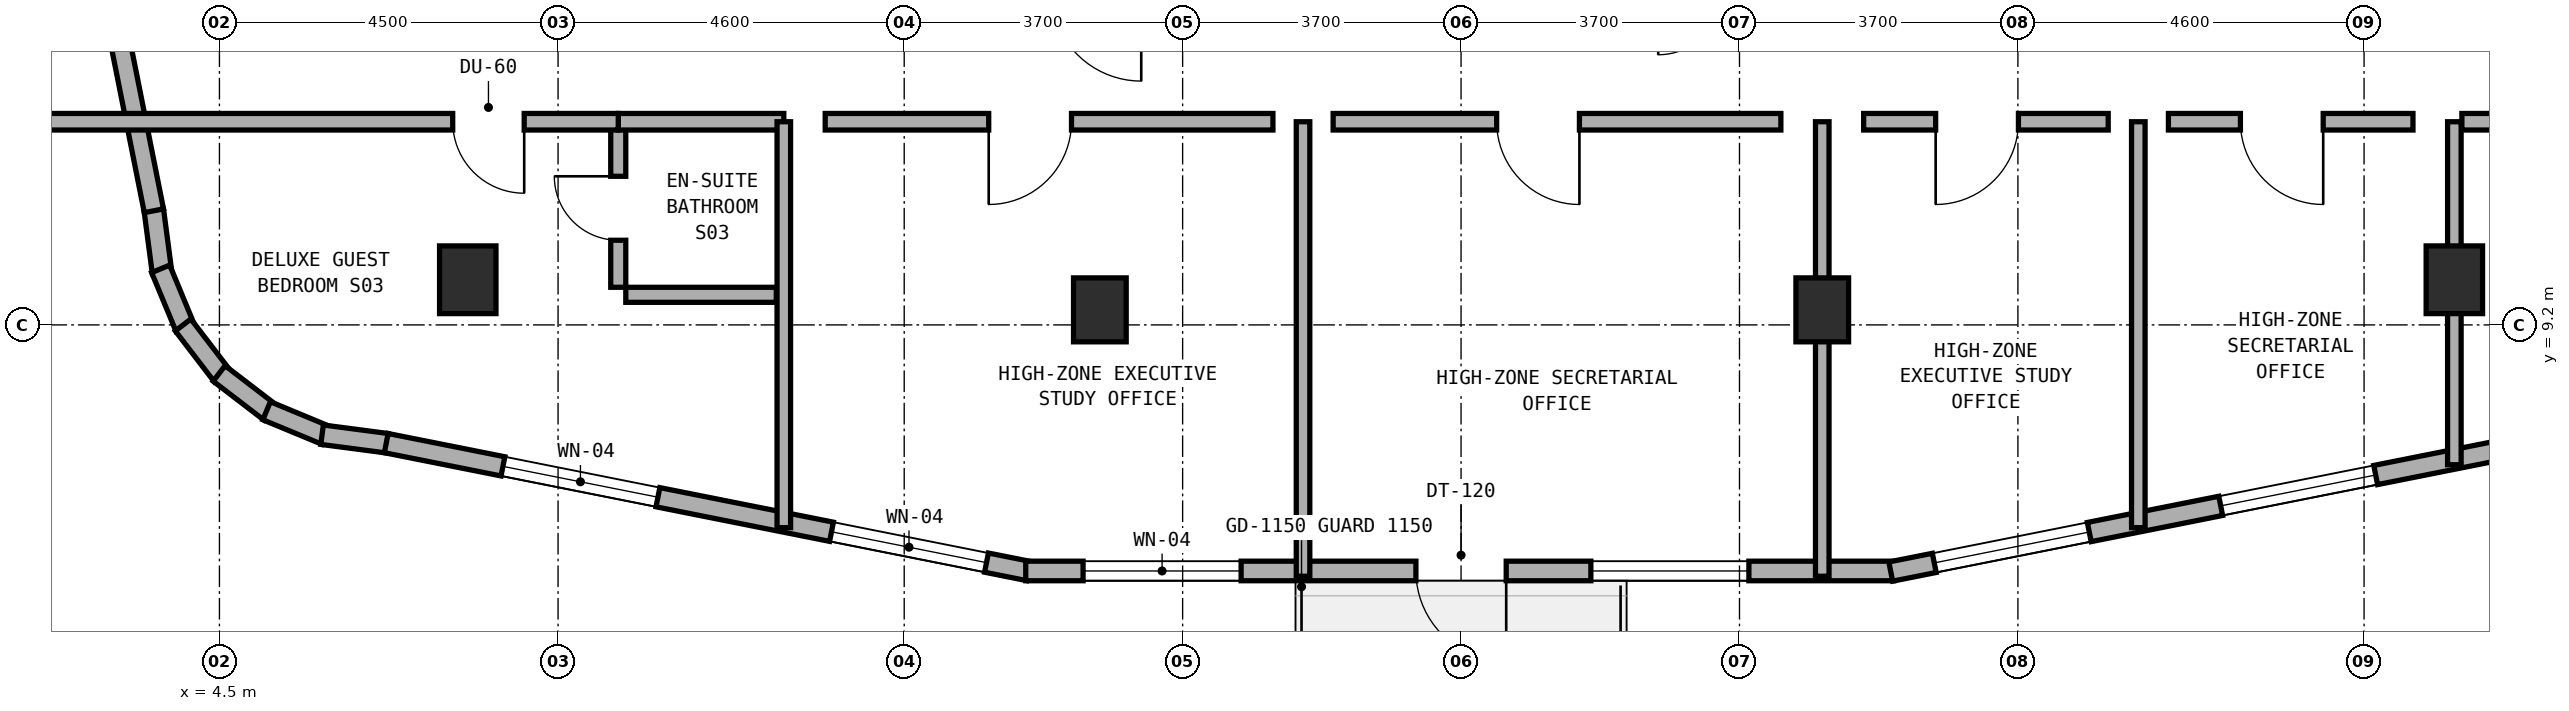
"""IFC4 building model, lengths in metres.
Left out: names, types, materials, properties, quantities, classifications, styles, units other than length and angle.
Written with IfcOpenShell. Run it as: python <this file> out.ifc"""

import sys

from ifc_helpers import new_model, si_unit, direction, frame, frame_2d, origin, origin_2d, place, context, subcontext, project, spatial, rectangle, extrude, element, fill, save


model = new_model("IFC4")
c1 = context("Model", 3, precision=1e-05, world=origin(), true_north=direction((0.0, 1.0)))
c2 = subcontext(c1, "Body", "Model", "MODEL_VIEW")
j1 = project(units=[si_unit("LENGTHUNIT", "METRE"), si_unit("PLANEANGLEUNIT", "RADIAN")], contexts=[c1])
p1 = place(None, origin())
s1 = spatial("IfcSite", under=j1, at=p1, CompositionType="ELEMENT")
p2 = place(p1, origin())
s2 = spatial("IfcBuilding", under=s1, at=p2, CompositionType="ELEMENT")
p3 = place(p2, frame((0.0, 0.0, 231.5)))
s3 = spatial("IfcBuildingStorey", under=s2, at=p3, CompositionType="ELEMENT", Elevation=231.5)
for number, where, z_axis, x_axis in (
    (1, (16.2, 9.4, 0.0), (0.0, 0.0, 1.0), (1.0, 0.0, 0.0)),
    (2, (25.8, 9.4, 0.0), (0.0, 0.0, 1.0), (1.0, 0.0, 0.0)),
):
    element("IfcColumn", number, at=place(p3, frame(where, z_axis=z_axis, x_axis=x_axis)), inside=s3, PredefinedType="COLUMN", context=c2, shape_type="SweptSolid", body=[
        extrude(rectangle(XDim=0.7, YDim=0.85, at=origin_2d()), origin(), (0.0, 0.0, 1.0), 3.6),
    ])
for number, where, z_axis, x_axis in (
    (3, (7.8, 9.8, 0.0), (0.0, 0.0, 1.0), (1.0, 0.0, 0.0)),
    (4, (34.2, 9.8, 0.0), (0.0, 0.0, 1.0), (1.0, 0.0, 0.0)),
):
    element("IfcColumn", number, at=place(p3, frame(where, z_axis=z_axis, x_axis=x_axis)), inside=s3, PredefinedType="COLUMN", context=c2, shape_type="SweptSolid", body=[
        extrude(rectangle(XDim=0.75, YDim=0.9, at=origin_2d()), origin(), (0.0, 0.0, 1.0), 3.6),
    ])
p4 = place(p3, frame((3.628, 10.725, 0.0), z_axis=(0.0, 0.0, 1.0), x_axis=(0.130954667764, -0.9913883573, 0.0)))
e5 = element("IfcWall", 5, at=p4, inside=s3, PredefinedType="STANDARD", context=c2, shape_type="SweptSolid", body=[
    extrude(rectangle(XDim=0.833, YDim=0.26, at=frame_2d((0.417, 0.0))), origin(), (0.0, 0.0, 1.0), 3.32),
])
p5 = place(p3, frame((3.719, 9.945, 0.0), z_axis=(0.0, 0.0, 1.0), x_axis=(0.382985169477, -0.923754491172, 0.0)))
e6 = element("IfcWall", 6, at=p5, inside=s3, PredefinedType="STANDARD", context=c2, shape_type="SweptSolid", body=[
    extrude(rectangle(XDim=0.851, YDim=0.26, at=frame_2d((0.426, 0.0))), origin(), (0.0, 0.0, 1.0), 3.32),
])
for number, where, z_axis, x_axis in (
    (7, (4.017, 9.199, 0.0), (0.0, 0.0, 1.0), (0.608, -0.794, 0.0)),
    (8, (4.496, 8.555, 0.0), (0.0, 0.0, 1.0), (0.794, -0.608, 0.0)),
):
    element("IfcWall", number, at=place(p3, frame(where, z_axis=z_axis, x_axis=x_axis)), inside=s3, PredefinedType="STANDARD", context=c2, shape_type="SweptSolid", body=[
        extrude(rectangle(XDim=0.85, YDim=0.26, at=frame_2d((0.425, 0.0))), origin(), (0.0, 0.0, 1.0), 3.32),
    ])
p6 = place(p3, frame((5.127, 8.059, 0.0), z_axis=(0.0, 0.0, 1.0), x_axis=(0.923652976167, -0.383229930484, 0.0)))
e9 = element("IfcWall", 9, at=p6, inside=s3, PredefinedType="STANDARD", context=c2, shape_type="SweptSolid", body=[
    extrude(rectangle(XDim=0.851, YDim=0.26, at=frame_2d((0.426, 0.0))), origin(), (0.0, 0.0, 1.0), 3.32),
])
p7 = place(p3, frame((5.864, 7.741, 0.0), z_axis=(0.0, 0.0, 1.0), x_axis=(0.991493480548, -0.130156359936, 0.0)))
e10 = element("IfcWall", 10, at=p7, inside=s3, PredefinedType="STANDARD", context=c2, shape_type="SweptSolid", body=[
    extrude(rectangle(XDim=0.868, YDim=0.26, at=frame_2d((0.434, 0.0))), origin(), (0.0, 0.0, 1.0), 3.32),
])
p8 = place(p3, frame((6.717, 7.629, 0.0), z_axis=(0.0, 0.0, 1.0), x_axis=(0.980748582507, -0.1952747242, 0.0)))
e11 = element("IfcWall", 11, at=p8, inside=s3, PredefinedType="STANDARD", context=c2, shape_type="SweptSolid", body=[
    extrude(rectangle(XDim=8.705, YDim=0.26, at=frame_2d((4.353, 0.0))), origin(), (0.0, 0.0, 1.0), 3.32),
])
p9 = place(p8, frame((1.581, 0.0, 0.85)))
e12 = element("IfcOpeningElement", 12, at=p9, cuts=e11, PredefinedType="OPENING", context=c2, shape_type="SweptSolid", body=[
    extrude(rectangle(XDim=2.1, YDim=1.5, at=frame_2d((1.05, 0.75))), frame((0.0, 0.14, 0.0), z_axis=(0.0, -1.0, 0.0), x_axis=(1.0, 0.0, 0.0)), (0.0, 0.0, 1.0), 0.28),
])
p10 = place(p8, frame((6.033, 0.0, 0.85)))
e13 = element("IfcOpeningElement", 13, at=p10, cuts=e11, PredefinedType="OPENING", context=c2, shape_type="SweptSolid", body=[
    extrude(rectangle(XDim=2.1, YDim=1.5, at=frame_2d((1.05, 0.75))), frame((0.0, 0.14, 0.0), z_axis=(0.0, -1.0, 0.0), x_axis=(1.0, 0.0, 0.0)), (0.0, 0.0, 1.0), 0.28),
])
p11 = place(p3, frame((15.215, 5.93, 0.0), z_axis=(0.0, 0.0, 1.0), x_axis=(1.0, 0.0, 0.0)))
e14 = element("IfcWall", 14, at=p11, inside=s3, PredefinedType="STANDARD", context=c2, shape_type="SweptSolid", body=[
    extrude(rectangle(XDim=11.535, YDim=0.26, at=frame_2d((5.768, 0.0))), origin(), (0.0, 0.0, 1.0), 3.32),
])
p12 = place(p11, frame((5.185, 0.0, 0.0)))
e15 = element("IfcOpeningElement", 15, at=p12, cuts=e14, PredefinedType="OPENING", context=c2, shape_type="SweptSolid", body=[
    extrude(rectangle(XDim=1.2, YDim=2.15, at=frame_2d((0.6, 1.075))), frame((0.0, 0.14, 0.0), z_axis=(0.0, -1.0, 0.0), x_axis=(1.0, 0.0, 0.0)), (0.0, 0.0, 1.0), 0.28),
])
p13 = place(p11, frame((0.762, 0.0, 0.85)))
e16 = element("IfcOpeningElement", 16, at=p13, cuts=e14, PredefinedType="OPENING", context=c2, shape_type="SweptSolid", body=[
    extrude(rectangle(XDim=2.1, YDim=1.5, at=frame_2d((1.05, 0.75))), frame((0.0, 0.14, 0.0), z_axis=(0.0, -1.0, 0.0), x_axis=(1.0, 0.0, 0.0)), (0.0, 0.0, 1.0), 0.28),
])
p14 = place(p11, frame((7.51, 0.0, 0.85)))
e17 = element("IfcOpeningElement", 17, at=p14, cuts=e14, PredefinedType="OPENING", context=c2, shape_type="SweptSolid", body=[
    extrude(rectangle(XDim=2.1, YDim=1.5, at=frame_2d((1.05, 0.75))), frame((0.0, 0.14, 0.0), z_axis=(0.0, -1.0, 0.0), x_axis=(1.0, 0.0, 0.0)), (0.0, 0.0, 1.0), 0.28),
])
p15 = place(p3, frame((26.71, 5.922, 0.0), z_axis=(0.0, 0.0, 1.0), x_axis=(0.980752174324, 0.195256683773, 0.0)))
e18 = element("IfcWall", 18, at=p15, inside=s3, PredefinedType="STANDARD", context=c2, shape_type="SweptSolid", body=[
    extrude(rectangle(XDim=8.741, YDim=0.26, at=frame_2d((4.371, 0.0))), origin(), (0.0, 0.0, 1.0), 3.32),
])
p16 = place(p15, frame((0.59, 0.0, 0.85)))
e19 = element("IfcOpeningElement", 19, at=p16, cuts=e18, PredefinedType="OPENING", context=c2, shape_type="SweptSolid", body=[
    extrude(rectangle(XDim=2.1, YDim=1.5, at=frame_2d((1.05, 0.75))), frame((0.0, 0.14, 0.0), z_axis=(0.0, -1.0, 0.0), x_axis=(1.0, 0.0, 0.0)), (0.0, 0.0, 1.0), 0.28),
])
p17 = place(p15, frame((4.471, 0.0, 0.85)))
e20 = element("IfcOpeningElement", 20, at=p17, cuts=e18, PredefinedType="OPENING", context=c2, shape_type="SweptSolid", body=[
    extrude(rectangle(XDim=2.1, YDim=1.5, at=frame_2d((1.05, 0.75))), frame((0.0, 0.14, 0.0), z_axis=(0.0, -1.0, 0.0), x_axis=(1.0, 0.0, 0.0)), (0.0, 0.0, 1.0), 0.28),
])
p18 = place(p3, frame((1.916, 19.319, 0.0), z_axis=(0.0, 0.0, 1.0), x_axis=(0.195291715883, -0.980745199176, 0.0)))
e21 = element("IfcWall", 21, at=p18, inside=s3, PredefinedType="STANDARD", context=c2, shape_type="SweptSolid", body=[
    extrude(rectangle(XDim=8.771, YDim=0.26, at=frame_2d((4.385, 0.0))), origin(), (0.0, 0.0, 1.0), 3.32),
])
p19 = place(p18, frame((2.67, 0.0, 0.85)))
e22 = element("IfcOpeningElement", 22, at=p19, cuts=e21, PredefinedType="OPENING", context=c2, shape_type="SweptSolid", body=[
    extrude(rectangle(XDim=2.1, YDim=1.5, at=frame_2d((1.05, 0.75))), frame((0.0, 0.14, 0.0), z_axis=(0.0, -1.0, 0.0), x_axis=(1.0, 0.0, 0.0)), (0.0, 0.0, 1.0), 0.28),
])
p20 = place(p3, frame((9.8, 9.7, 0.0), z_axis=(0.0, 0.0, 1.0), x_axis=(0.0, 1.0, 0.0)))
e23 = element("IfcWall", 23, at=p20, inside=s3, PredefinedType="PLUMBINGWALL", context=c2, shape_type="SweptSolid", body=[
    extrude(rectangle(XDim=2.1, YDim=0.2, at=frame_2d((1.05, 0.0))), origin(), (0.0, 0.0, 1.0), 2.895),
])
p21 = place(p20, frame((0.625, 0.0, 0.0)))
e24 = element("IfcOpeningElement", 24, at=p21, cuts=e23, PredefinedType="OPENING", context=c2, shape_type="SweptSolid", body=[
    extrude(rectangle(XDim=0.85, YDim=2.1, at=frame_2d((0.425, 1.05))), frame((0.0, 0.11, 0.0), z_axis=(0.0, -1.0, 0.0), x_axis=(1.0, 0.0, 0.0)), (0.0, 0.0, 1.0), 0.22),
])
p22 = place(p3, frame((9.9, 9.6, 0.0), z_axis=(0.0, 0.0, 1.0), x_axis=(1.0, 0.0, 0.0)))
e25 = element("IfcWall", 25, at=p22, inside=s3, PredefinedType="PLUMBINGWALL", context=c2, shape_type="SweptSolid", body=[
    extrude(rectangle(XDim=2.0, YDim=0.2, at=frame_2d((1.0, 0.0))), origin(), (0.0, 0.0, 1.0), 3.015),
])
p23 = place(p3, frame((9.8, 11.9, 0.0), z_axis=(0.0, 0.0, 1.0), x_axis=(1.0, 0.0, 0.0)))
e26 = element("IfcWall", 26, at=p23, inside=s3, PredefinedType="SOLIDWALL", context=c2, shape_type="SweptSolid", body=[
    extrude(rectangle(XDim=2.2, YDim=0.22, at=frame_2d((1.1, 0.0))), origin(), (0.0, 0.0, 1.0), 3.32),
])
p24 = place(p3, frame((1.96, 11.9, 0.0), z_axis=(0.0, 0.0, 1.0), x_axis=(1.0, 0.0, 0.0)))
e27 = element("IfcWall", 27, at=p24, inside=s3, PredefinedType="SOLIDWALL", context=c2, shape_type="SweptSolid", body=[
    extrude(rectangle(XDim=7.84, YDim=0.22, at=frame_2d((3.92, 0.0))), origin(), (0.0, 0.0, 1.0), 2.745),
])
p25 = place(p24, frame((5.64, 0.0, 0.0)))
e28 = element("IfcOpeningElement", 28, at=p25, cuts=e27, PredefinedType="OPENING", context=c2, shape_type="SweptSolid", body=[
    extrude(rectangle(XDim=0.95, YDim=2.1, at=frame_2d((0.475, 1.05))), frame((0.0, 0.12, 0.0), z_axis=(0.0, -1.0, 0.0), x_axis=(1.0, 0.0, 0.0)), (0.0, 0.0, 1.0), 0.24),
])
p26 = place(p3, frame((12.0, 6.506, 0.0), z_axis=(0.0, 0.0, 1.0), x_axis=(0.0, 1.0, 0.0)))
e29 = element("IfcWall", 29, at=p26, inside=s3, PredefinedType="SOLIDWALL", context=c2, shape_type="SweptSolid", body=[
    extrude(rectangle(XDim=5.394, YDim=0.18, at=frame_2d((2.697, 0.0))), origin(), (0.0, 0.0, 1.0), 2.895),
])
p27 = place(p3, frame((18.9, 5.86, 0.0), z_axis=(0.0, 0.0, 1.0), x_axis=(0.0, 1.0, 0.0)))
e30 = element("IfcWall", 30, at=p27, inside=s3, PredefinedType="SOLIDWALL", context=c2, shape_type="SweptSolid", body=[
    extrude(rectangle(XDim=6.04, YDim=0.18, at=frame_2d((3.02, 0.0))), origin(), (0.0, 0.0, 1.0), 2.895),
])
p28 = place(p3, frame((12.55, 11.9, 0.0), z_axis=(0.0, 0.0, 1.0), x_axis=(1.0, 0.0, 0.0)))
e31 = element("IfcWall", 31, at=p28, inside=s3, PredefinedType="SOLIDWALL", context=c2, shape_type="SweptSolid", body=[
    extrude(rectangle(XDim=5.95, YDim=0.22, at=frame_2d((2.975, 0.0))), origin(), (0.0, 0.0, 1.0), 2.745),
])
p29 = place(p28, frame((2.173, 0.0, 0.0)))
e32 = element("IfcOpeningElement", 32, at=p29, cuts=e31, PredefinedType="OPENING", context=c2, shape_type="SweptSolid", body=[
    extrude(rectangle(XDim=1.1, YDim=2.1, at=frame_2d((0.55, 1.05))), frame((0.0, 0.12, 0.0), z_axis=(0.0, -1.0, 0.0), x_axis=(1.0, 0.0, 0.0)), (0.0, 0.0, 1.0), 0.24),
])
p30 = place(p3, frame((19.3, 11.9, 0.0), z_axis=(0.0, 0.0, 1.0), x_axis=(1.0, 0.0, 0.0)))
e33 = element("IfcWall", 33, at=p30, inside=s3, PredefinedType="SOLIDWALL", context=c2, shape_type="SweptSolid", body=[
    extrude(rectangle(XDim=5.95, YDim=0.22, at=frame_2d((2.975, 0.0))), origin(), (0.0, 0.0, 1.0), 3.32),
])
p31 = place(p30, frame((2.173, 0.0, 0.0)))
e34 = element("IfcOpeningElement", 34, at=p31, cuts=e33, PredefinedType="OPENING", context=c2, shape_type="SweptSolid", body=[
    extrude(rectangle(XDim=1.1, YDim=2.1, at=frame_2d((0.55, 1.05))), frame((0.0, 0.12, 0.0), z_axis=(0.0, -1.0, 0.0), x_axis=(1.0, 0.0, 0.0)), (0.0, 0.0, 1.0), 0.24),
])
p32 = place(p3, frame((25.8, 5.86, 0.0), z_axis=(0.0, 0.0, 1.0), x_axis=(0.0, 1.0, 0.0)))
e35 = element("IfcWall", 35, at=p32, inside=s3, PredefinedType="SOLIDWALL", context=c2, shape_type="SweptSolid", body=[
    extrude(rectangle(XDim=6.04, YDim=0.18, at=frame_2d((3.02, 0.0))), origin(), (0.0, 0.0, 1.0), 2.745),
])
p33 = place(p3, frame((30.0, 6.506, 0.0), z_axis=(0.0, 0.0, 1.0), x_axis=(0.0, 1.0, 0.0)))
e36 = element("IfcWall", 36, at=p33, inside=s3, PredefinedType="SOLIDWALL", context=c2, shape_type="SweptSolid", body=[
    extrude(rectangle(XDim=5.394, YDim=0.18, at=frame_2d((2.697, 0.0))), origin(), (0.0, 0.0, 1.0), 2.895),
])
p34 = place(p3, frame((26.35, 11.9, 0.0), z_axis=(0.0, 0.0, 1.0), x_axis=(1.0, 0.0, 0.0)))
e37 = element("IfcWall", 37, at=p34, inside=s3, PredefinedType="SOLIDWALL", context=c2, shape_type="SweptSolid", body=[
    extrude(rectangle(XDim=3.25, YDim=0.22, at=frame_2d((1.625, 0.0))), origin(), (0.0, 0.0, 1.0), 2.745),
])
p35 = place(p34, frame((0.957, 0.0, 0.0)))
e38 = element("IfcOpeningElement", 38, at=p35, cuts=e37, PredefinedType="OPENING", context=c2, shape_type="SweptSolid", body=[
    extrude(rectangle(XDim=1.1, YDim=2.1, at=frame_2d((0.55, 1.05))), frame((0.0, 0.12, 0.0), z_axis=(0.0, -1.0, 0.0), x_axis=(1.0, 0.0, 0.0)), (0.0, 0.0, 1.0), 0.24),
])
p36 = place(p3, frame((30.4, 11.9, 0.0), z_axis=(0.0, 0.0, 1.0), x_axis=(1.0, 0.0, 0.0)))
e39 = element("IfcWall", 39, at=p36, inside=s3, PredefinedType="SOLIDWALL", context=c2, shape_type="SweptSolid", body=[
    extrude(rectangle(XDim=3.25, YDim=0.22, at=frame_2d((1.625, 0.0))), origin(), (0.0, 0.0, 1.0), 3.32),
])
p37 = place(p36, frame((0.957, 0.0, 0.0)))
e40 = element("IfcOpeningElement", 40, at=p37, cuts=e39, PredefinedType="OPENING", context=c2, shape_type="SweptSolid", body=[
    extrude(rectangle(XDim=1.1, YDim=2.1, at=frame_2d((0.55, 1.05))), frame((0.0, 0.12, 0.0), z_axis=(0.0, -1.0, 0.0), x_axis=(1.0, 0.0, 0.0)), (0.0, 0.0, 1.0), 0.24),
])
p38 = place(p3, frame((34.2, 7.342, 0.0), z_axis=(0.0, 0.0, 1.0), x_axis=(0.0, 1.0, 0.0)))
e41 = element("IfcWall", 41, at=p38, inside=s3, PredefinedType="SOLIDWALL", context=c2, shape_type="SweptSolid", body=[
    extrude(rectangle(XDim=4.558, YDim=0.18, at=frame_2d((2.279, 0.0))), origin(), (0.0, 0.0, 1.0), 2.745),
])
p39 = place(p3, frame((34.3, 11.9, 0.0), z_axis=(0.0, 0.0, 1.0), x_axis=(1.0, 0.0, 0.0)))
e42 = element("IfcWall", 42, at=p39, inside=s3, PredefinedType="SOLIDWALL", context=c2, shape_type="SweptSolid", body=[
    extrude(rectangle(XDim=5.64, YDim=0.22, at=frame_2d((2.82, 0.0))), origin(), (0.0, 0.0, 1.0), 3.015),
])
p40 = place(p39, frame((2.1, 0.0, 0.0)))
e43 = element("IfcOpeningElement", 43, at=p40, cuts=e42, PredefinedType="OPENING", context=c2, shape_type="SweptSolid", body=[
    extrude(rectangle(XDim=0.95, YDim=2.1, at=frame_2d((0.475, 1.05))), frame((0.0, 0.12, 0.0), z_axis=(0.0, -1.0, 0.0), x_axis=(1.0, 0.0, 0.0)), (0.0, 0.0, 1.0), 0.24),
])
p41 = place(p9, origin())
e44 = element("IfcWindow", 44, at=p41, inside=s3, PartitioningType="SINGLE_PANEL", PredefinedType="WINDOW", context=c2, shape_type="SweptSolid", body=[
    extrude(rectangle(XDim=2.1, YDim=1.5, at=frame_2d((1.05, 0.75))), frame((0.0, 0.03, 0.0), z_axis=(0.0, -1.0, 0.0), x_axis=(1.0, 0.0, 0.0)), (0.0, 0.0, 1.0), 0.06),
])
fill(e12, e44)
p42 = place(p10, origin())
e45 = element("IfcWindow", 45, at=p42, inside=s3, PartitioningType="SINGLE_PANEL", PredefinedType="WINDOW", context=c2, shape_type="SweptSolid", body=[
    extrude(rectangle(XDim=2.1, YDim=1.5, at=frame_2d((1.05, 0.75))), frame((0.0, 0.03, 0.0), z_axis=(0.0, -1.0, 0.0), x_axis=(1.0, 0.0, 0.0)), (0.0, 0.0, 1.0), 0.06),
])
fill(e13, e45)
p43 = place(p12, frame((1.2, 0.0, 0.0), z_axis=(0.0, 0.0, 1.0), x_axis=(-1.0, 0.0, 0.0)))
e46 = element("IfcDoor", 46, at=p43, inside=s3, OperationType="SINGLE_SWING_LEFT", PredefinedType="DOOR", context=c2, shape_type="SweptSolid", body=[
    extrude(rectangle(XDim=1.2, YDim=2.15, at=frame_2d((0.6, 1.075))), frame((0.0, 0.025, 0.0), z_axis=(0.0, -1.0, 0.0), x_axis=(1.0, 0.0, 0.0)), (0.0, 0.0, 1.0), 0.05),
])
fill(e15, e46)
p44 = place(p13, origin())
e47 = element("IfcWindow", 47, at=p44, inside=s3, PartitioningType="SINGLE_PANEL", PredefinedType="WINDOW", context=c2, shape_type="SweptSolid", body=[
    extrude(rectangle(XDim=2.1, YDim=1.5, at=frame_2d((1.05, 0.75))), frame((0.0, 0.03, 0.0), z_axis=(0.0, -1.0, 0.0), x_axis=(1.0, 0.0, 0.0)), (0.0, 0.0, 1.0), 0.06),
])
fill(e16, e47)
p45 = place(p14, origin())
e48 = element("IfcWindow", 48, at=p45, inside=s3, PartitioningType="SINGLE_PANEL", PredefinedType="WINDOW", context=c2, shape_type="SweptSolid", body=[
    extrude(rectangle(XDim=2.1, YDim=1.5, at=frame_2d((1.05, 0.75))), frame((0.0, 0.03, 0.0), z_axis=(0.0, -1.0, 0.0), x_axis=(1.0, 0.0, 0.0)), (0.0, 0.0, 1.0), 0.06),
])
fill(e17, e48)
p46 = place(p16, origin())
e49 = element("IfcWindow", 49, at=p46, inside=s3, PartitioningType="SINGLE_PANEL", PredefinedType="WINDOW", context=c2, shape_type="SweptSolid", body=[
    extrude(rectangle(XDim=2.1, YDim=1.5, at=frame_2d((1.05, 0.75))), frame((0.0, 0.03, 0.0), z_axis=(0.0, -1.0, 0.0), x_axis=(1.0, 0.0, 0.0)), (0.0, 0.0, 1.0), 0.06),
])
fill(e19, e49)
p47 = place(p17, origin())
e50 = element("IfcWindow", 50, at=p47, inside=s3, PartitioningType="SINGLE_PANEL", PredefinedType="WINDOW", context=c2, shape_type="SweptSolid", body=[
    extrude(rectangle(XDim=2.1, YDim=1.5, at=frame_2d((1.05, 0.75))), frame((0.0, 0.03, 0.0), z_axis=(0.0, -1.0, 0.0), x_axis=(1.0, 0.0, 0.0)), (0.0, 0.0, 1.0), 0.06),
])
fill(e20, e50)
p48 = place(p21, origin())
e51 = element("IfcDoor", 51, at=p48, inside=s3, OperationType="SINGLE_SWING_RIGHT", PredefinedType="DOOR", context=c2, shape_type="SweptSolid", body=[
    extrude(rectangle(XDim=0.85, YDim=2.1, at=frame_2d((0.425, 1.05))), frame((0.0, 0.025, 0.0), z_axis=(0.0, -1.0, 0.0), x_axis=(1.0, 0.0, 0.0)), (0.0, 0.0, 1.0), 0.05),
])
fill(e24, e51)
p49 = place(p25, frame((0.95, 0.0, 0.0), z_axis=(0.0, 0.0, 1.0), x_axis=(-1.0, 0.0, 0.0)))
e52 = element("IfcDoor", 52, at=p49, inside=s3, OperationType="SINGLE_SWING_LEFT", PredefinedType="DOOR", context=c2, shape_type="SweptSolid", body=[
    extrude(rectangle(XDim=0.95, YDim=2.1, at=frame_2d((0.475, 1.05))), frame((0.0, 0.025, 0.0), z_axis=(0.0, -1.0, 0.0), x_axis=(1.0, 0.0, 0.0)), (0.0, 0.0, 1.0), 0.05),
])
fill(e28, e52)
p50 = place(p29, frame((1.1, 0.0, 0.0), z_axis=(0.0, 0.0, 1.0), x_axis=(-1.0, 0.0, 0.0)))
e53 = element("IfcDoor", 53, at=p50, inside=s3, OperationType="SINGLE_SWING_RIGHT", PredefinedType="DOOR", context=c2, shape_type="SweptSolid", body=[
    extrude(rectangle(XDim=1.1, YDim=2.1, at=frame_2d((0.55, 1.05))), frame((0.0, 0.025, 0.0), z_axis=(0.0, -1.0, 0.0), x_axis=(1.0, 0.0, 0.0)), (0.0, 0.0, 1.0), 0.05),
])
fill(e32, e53)
p51 = place(p31, frame((1.1, 0.0, 0.0), z_axis=(0.0, 0.0, 1.0), x_axis=(-1.0, 0.0, 0.0)))
e54 = element("IfcDoor", 54, at=p51, inside=s3, OperationType="SINGLE_SWING_LEFT", PredefinedType="DOOR", context=c2, shape_type="SweptSolid", body=[
    extrude(rectangle(XDim=1.1, YDim=2.1, at=frame_2d((0.55, 1.05))), frame((0.0, 0.025, 0.0), z_axis=(0.0, -1.0, 0.0), x_axis=(1.0, 0.0, 0.0)), (0.0, 0.0, 1.0), 0.05),
])
fill(e34, e54)
p52 = place(p35, frame((1.1, 0.0, 0.0), z_axis=(0.0, 0.0, 1.0), x_axis=(-1.0, 0.0, 0.0)))
e55 = element("IfcDoor", 55, at=p52, inside=s3, OperationType="SINGLE_SWING_RIGHT", PredefinedType="DOOR", context=c2, shape_type="SweptSolid", body=[
    extrude(rectangle(XDim=1.1, YDim=2.1, at=frame_2d((0.55, 1.05))), frame((0.0, 0.025, 0.0), z_axis=(0.0, -1.0, 0.0), x_axis=(1.0, 0.0, 0.0)), (0.0, 0.0, 1.0), 0.05),
])
fill(e38, e55)
p53 = place(p37, frame((1.1, 0.0, 0.0), z_axis=(0.0, 0.0, 1.0), x_axis=(-1.0, 0.0, 0.0)))
e56 = element("IfcDoor", 56, at=p53, inside=s3, OperationType="SINGLE_SWING_LEFT", PredefinedType="DOOR", context=c2, shape_type="SweptSolid", body=[
    extrude(rectangle(XDim=1.1, YDim=2.1, at=frame_2d((0.55, 1.05))), frame((0.0, 0.025, 0.0), z_axis=(0.0, -1.0, 0.0), x_axis=(1.0, 0.0, 0.0)), (0.0, 0.0, 1.0), 0.05),
])
fill(e40, e56)
save(model, sys.argv[1])
